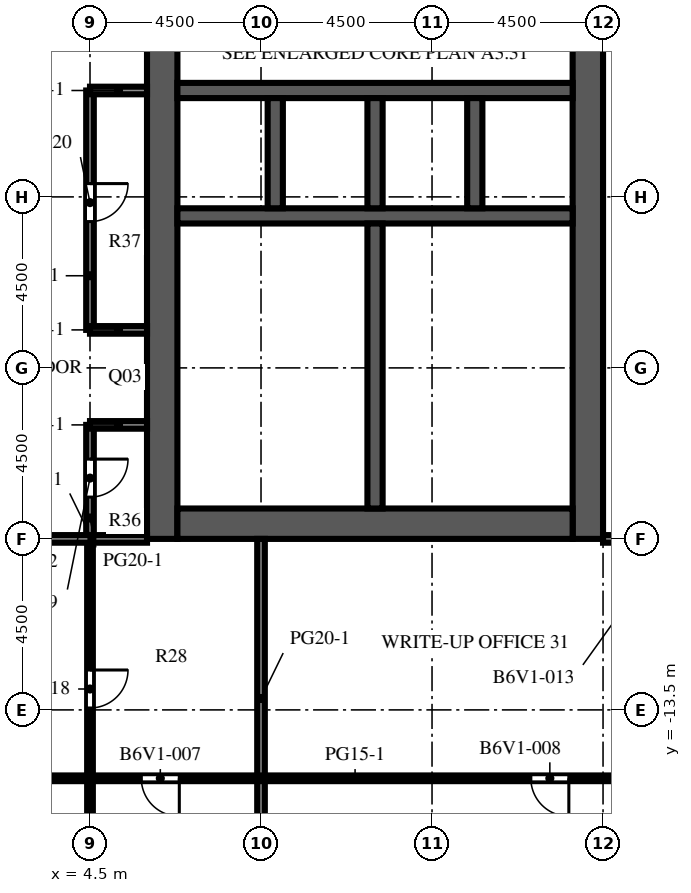
"""IFC4 building model, lengths in metres.
Left out: names, types, materials, properties, quantities, classifications, styles, units other than length and angle.
Written with IfcOpenShell. Run it as: python <this file> out.ifc"""

import sys

from ifc_helpers import new_model, si_unit, direction, frame, frame_2d, origin, place, context, subcontext, project, spatial, rectangle, extrude, element, fill, save


model = new_model("IFC4")
c1 = context("Model", 3, precision=1e-05, world=origin(), true_north=direction((0.0, 1.0)))
c2 = subcontext(c1, "Body", "Model", "MODEL_VIEW")
j1 = project(units=[si_unit("LENGTHUNIT", "METRE"), si_unit("PLANEANGLEUNIT", "RADIAN")], contexts=[c1])
p1 = place(None, origin())
s1 = spatial("IfcSite", under=j1, at=p1, CompositionType="ELEMENT")
p2 = place(p1, origin())
s2 = spatial("IfcBuilding", under=s1, at=p2, CompositionType="ELEMENT")
p3 = place(p2, frame((0.0, 0.0, 203.8)))
s3 = spatial("IfcBuildingStorey", under=s2, at=p3, CompositionType="ELEMENT", Elevation=203.8)
p4 = place(p3, frame((6.4, -9.0, 0.0), z_axis=(0.0, 0.0, 1.0), x_axis=(0.0, 1.0, 0.0)))
e1 = element("IfcWall", 1, at=p4, inside=s3, PredefinedType="SHEAR", context=c2, shape_type="SweptSolid", body=[
    extrude(rectangle(XDim=27.5, YDim=0.8, at=frame_2d((13.75, 0.0))), origin(), (0.0, 0.0, 1.0), 4.1),
])
p5 = place(p4, frame((12.55, 0.0, 0.0)))
e2 = element("IfcOpeningElement", 2, at=p5, cuts=e1, PredefinedType="OPENING", context=c2, shape_type="SweptSolid", body=[
    extrude(rectangle(XDim=2.4, YDim=2.4, at=frame_2d((1.2, 1.2))), frame((0.0, 0.41, 0.0), z_axis=(0.0, -1.0, 0.0), x_axis=(1.0, 0.0, 0.0)), (0.0, 0.0, 1.0), 0.82),
])
p6 = place(p4, frame((3.95, 0.0, 0.0)))
e3 = element("IfcOpeningElement", 3, at=p6, cuts=e1, PredefinedType="OPENING", context=c2, shape_type="SweptSolid", body=[
    extrude(rectangle(XDim=1.2, YDim=2.1, at=frame_2d((0.6, 1.05))), frame((0.0, 0.41, 0.0), z_axis=(0.0, -1.0, 0.0), x_axis=(1.0, 0.0, 0.0)), (0.0, 0.0, 1.0), 0.82),
])
p7 = place(p4, frame((22.35, 0.0, 0.0)))
e4 = element("IfcOpeningElement", 4, at=p7, cuts=e1, PredefinedType="OPENING", context=c2, shape_type="SweptSolid", body=[
    extrude(rectangle(XDim=1.2, YDim=2.1, at=frame_2d((0.6, 1.05))), frame((0.0, 0.41, 0.0), z_axis=(0.0, -1.0, 0.0), x_axis=(1.0, 0.0, 0.0)), (0.0, 0.0, 1.0), 0.82),
])
p8 = place(p3, frame((17.6, -9.0, 0.0), z_axis=(0.0, 0.0, 1.0), x_axis=(0.0, 1.0, 0.0)))
e5 = element("IfcWall", 5, at=p8, inside=s3, PredefinedType="SHEAR", context=c2, shape_type="SweptSolid", body=[
    extrude(rectangle(XDim=27.5, YDim=0.8, at=frame_2d((13.75, 0.0))), origin(), (0.0, 0.0, 1.0), 4.1),
])
p9 = place(p8, frame((12.55, 0.0, 0.0)))
e6 = element("IfcOpeningElement", 6, at=p9, cuts=e5, PredefinedType="OPENING", context=c2, shape_type="SweptSolid", body=[
    extrude(rectangle(XDim=2.4, YDim=2.4, at=frame_2d((1.2, 1.2))), frame((0.0, 0.41, 0.0), z_axis=(0.0, -1.0, 0.0), x_axis=(1.0, 0.0, 0.0)), (0.0, 0.0, 1.0), 0.82),
])
p10 = place(p8, frame((6.825, 0.0, 0.0)))
e7 = element("IfcOpeningElement", 7, at=p10, cuts=e5, PredefinedType="OPENING", context=c2, shape_type="SweptSolid", body=[
    extrude(rectangle(XDim=1.2, YDim=2.1, at=frame_2d((0.6, 1.05))), frame((0.0, 0.41, 0.0), z_axis=(0.0, -1.0, 0.0), x_axis=(1.0, 0.0, 0.0)), (0.0, 0.0, 1.0), 0.82),
])
p11 = place(p8, frame((19.475, 0.0, 0.0)))
e8 = element("IfcOpeningElement", 8, at=p11, cuts=e5, PredefinedType="OPENING", context=c2, shape_type="SweptSolid", body=[
    extrude(rectangle(XDim=1.2, YDim=2.1, at=frame_2d((0.6, 1.05))), frame((0.0, 0.41, 0.0), z_axis=(0.0, -1.0, 0.0), x_axis=(1.0, 0.0, 0.0)), (0.0, 0.0, 1.0), 0.82),
])
p12 = place(p3, frame((6.8, -8.6, 0.0), z_axis=(0.0, 0.0, 1.0), x_axis=(1.0, 0.0, 0.0)))
e9 = element("IfcWall", 9, at=p12, inside=s3, PredefinedType="SHEAR", context=c2, shape_type="SweptSolid", body=[
    extrude(rectangle(XDim=10.4, YDim=0.8, at=frame_2d((5.2, 0.0))), origin(), (0.0, 0.0, 1.0), 4.1),
])
p13 = place(p3, frame((6.8, -0.5, 0.0), z_axis=(0.0, 0.0, 1.0), x_axis=(1.0, 0.0, 0.0)))
e10 = element("IfcWall", 10, at=p13, inside=s3, PredefinedType="SHEAR", context=c2, shape_type="SweptSolid", body=[
    extrude(rectangle(XDim=10.4, YDim=0.4, at=frame_2d((5.2, 0.0))), origin(), (0.0, 0.0, 1.0), 4.1),
])
p14 = place(p3, frame((6.8, 2.8, 0.0), z_axis=(0.0, 0.0, 1.0), x_axis=(1.0, 0.0, 0.0)))
e11 = element("IfcWall", 11, at=p14, inside=s3, PredefinedType="SHEAR", context=c2, shape_type="SweptSolid", body=[
    extrude(rectangle(XDim=10.4, YDim=0.4, at=frame_2d((5.2, 0.0))), origin(), (0.0, 0.0, 1.0), 4.1),
])
p15 = place(p14, frame((0.738, 0.0, 0.0)))
e12 = element("IfcOpeningElement", 12, at=p15, cuts=e11, PredefinedType="OPENING", context=c2, shape_type="SweptSolid", body=[
    extrude(rectangle(XDim=1.1, YDim=2.1, at=frame_2d((0.55, 1.05))), frame((0.0, 0.21, 0.0), z_axis=(0.0, -1.0, 0.0), x_axis=(1.0, 0.0, 0.0)), (0.0, 0.0, 1.0), 0.42),
])
p16 = place(p14, frame((3.337, 0.0, 0.0)))
e13 = element("IfcOpeningElement", 13, at=p16, cuts=e11, PredefinedType="OPENING", context=c2, shape_type="SweptSolid", body=[
    extrude(rectangle(XDim=1.1, YDim=2.1, at=frame_2d((0.55, 1.05))), frame((0.0, 0.21, 0.0), z_axis=(0.0, -1.0, 0.0), x_axis=(1.0, 0.0, 0.0)), (0.0, 0.0, 1.0), 0.42),
])
p17 = place(p14, frame((6.012, 0.0, 0.0)))
e14 = element("IfcOpeningElement", 14, at=p17, cuts=e11, PredefinedType="OPENING", context=c2, shape_type="SweptSolid", body=[
    extrude(rectangle(XDim=1.0, YDim=2.1, at=frame_2d((0.5, 1.05))), frame((0.0, 0.21, 0.0), z_axis=(0.0, -1.0, 0.0), x_axis=(1.0, 0.0, 0.0)), (0.0, 0.0, 1.0), 0.42),
])
p18 = place(p14, frame((8.613, 0.0, 0.0)))
e15 = element("IfcOpeningElement", 15, at=p18, cuts=e11, PredefinedType="OPENING", context=c2, shape_type="SweptSolid", body=[
    extrude(rectangle(XDim=1.0, YDim=2.1, at=frame_2d((0.5, 1.05))), frame((0.0, 0.21, 0.0), z_axis=(0.0, -1.0, 0.0), x_axis=(1.0, 0.0, 0.0)), (0.0, 0.0, 1.0), 0.42),
])
for number, where, z_axis, x_axis in (
    (16, (9.375, -0.3, 0.0), (0.0, 0.0, 1.0), (0.0, 1.0, 0.0)),
    (17, (12.0, -0.3, 0.0), (0.0, 0.0, 1.0), (0.0, 1.0, 0.0)),
    (18, (14.625, -0.3, 0.0), (0.0, 0.0, 1.0), (0.0, 1.0, 0.0)),
):
    element("IfcWall", number, at=place(p3, frame(where, z_axis=z_axis, x_axis=x_axis)), inside=s3, PredefinedType="SHEAR", context=c2, shape_type="SweptSolid", body=[
        extrude(rectangle(XDim=2.9, YDim=0.4, at=frame_2d((1.45, 0.0))), origin(), (0.0, 0.0, 1.0), 4.1),
    ])
p19 = place(p3, frame((12.0, -8.2, 0.0), z_axis=(0.0, 0.0, 1.0), x_axis=(0.0, 1.0, 0.0)))
e19 = element("IfcWall", 19, at=p19, inside=s3, PredefinedType="SHEAR", context=c2, shape_type="SweptSolid", body=[
    extrude(rectangle(XDim=7.5, YDim=0.4, at=frame_2d((3.75, 0.0))), origin(), (0.0, 0.0, 1.0), 4.1),
])
p20 = place(p3, frame((8.3, -8.2, 0.0), z_axis=(0.0, 0.0, 1.0), x_axis=(0.0, 1.0, 0.0)))
e20 = element("IfcWall", 20, at=p20, inside=s3, PredefinedType="PARTITIONING", context=c2, shape_type="SweptSolid", body=[
    extrude(rectangle(XDim=2.25, YDim=0.1, at=frame_2d((1.125, 0.0))), origin(), (0.0, 0.0, 1.0), 3.65),
])
p21 = place(p20, frame((0.625, 0.0, 0.0)))
e21 = element("IfcOpeningElement", 21, at=p21, cuts=e20, PredefinedType="OPENING", context=c2, shape_type="SweptSolid", body=[
    extrude(rectangle(XDim=1.0, YDim=2.1, at=frame_2d((0.5, 1.05))), frame((0.0, 0.06, 0.0), z_axis=(0.0, -1.0, 0.0), x_axis=(1.0, 0.0, 0.0)), (0.0, 0.0, 1.0), 0.12),
])
p22 = place(p3, frame((8.3, -5.95, 0.0), z_axis=(0.0, 0.0, 1.0), x_axis=(0.0, 1.0, 0.0)))
e22 = element("IfcWall", 22, at=p22, inside=s3, PredefinedType="PARTITIONING", context=c2, shape_type="SweptSolid", body=[
    extrude(rectangle(XDim=2.25, YDim=0.1, at=frame_2d((1.125, 0.0))), origin(), (0.0, 0.0, 1.0), 3.65),
])
p23 = place(p22, frame((0.625, 0.0, 0.0)))
e23 = element("IfcOpeningElement", 23, at=p23, cuts=e22, PredefinedType="OPENING", context=c2, shape_type="SweptSolid", body=[
    extrude(rectangle(XDim=1.0, YDim=2.1, at=frame_2d((0.5, 1.05))), frame((0.0, 0.06, 0.0), z_axis=(0.0, -1.0, 0.0), x_axis=(1.0, 0.0, 0.0)), (0.0, 0.0, 1.0), 0.12),
])
p24 = place(p3, frame((8.3, -3.7, 0.0), z_axis=(0.0, 0.0, 1.0), x_axis=(0.0, 1.0, 0.0)))
e24 = element("IfcWall", 24, at=p24, inside=s3, PredefinedType="PARTITIONING", context=c2, shape_type="SweptSolid", body=[
    extrude(rectangle(XDim=1.65, YDim=0.1, at=frame_2d((0.825, 0.0))), origin(), (0.0, 0.0, 1.0), 3.65),
])
p25 = place(p24, frame((0.325, 0.0, 0.0)))
e25 = element("IfcOpeningElement", 25, at=p25, cuts=e24, PredefinedType="OPENING", context=c2, shape_type="SweptSolid", body=[
    extrude(rectangle(XDim=1.0, YDim=2.1, at=frame_2d((0.5, 1.05))), frame((0.0, 0.06, 0.0), z_axis=(0.0, -1.0, 0.0), x_axis=(1.0, 0.0, 0.0)), (0.0, 0.0, 1.0), 0.12),
])
p26 = place(p3, frame((8.3, -2.05, 0.0), z_axis=(0.0, 0.0, 1.0), x_axis=(0.0, 1.0, 0.0)))
e26 = element("IfcWall", 26, at=p26, inside=s3, PredefinedType="PARTITIONING", context=c2, shape_type="SweptSolid", body=[
    extrude(rectangle(XDim=1.35, YDim=0.1, at=frame_2d((0.675, 0.0))), origin(), (0.0, 0.0, 1.0), 3.65),
])
p27 = place(p26, frame((0.2, 0.0, 0.0)))
e27 = element("IfcOpeningElement", 27, at=p27, cuts=e26, PredefinedType="OPENING", context=c2, shape_type="SweptSolid", body=[
    extrude(rectangle(XDim=0.95, YDim=2.1, at=frame_2d((0.475, 1.05))), frame((0.0, 0.06, 0.0), z_axis=(0.0, -1.0, 0.0), x_axis=(1.0, 0.0, 0.0)), (0.0, 0.0, 1.0), 0.12),
])
for number, where, z_axis, x_axis in (
    (28, (8.3, -5.95, 0.0), (0.0, 0.0, 1.0), (1.0, 0.0, 0.0)),
    (29, (8.3, -3.7, 0.0), (0.0, 0.0, 1.0), (1.0, 0.0, 0.0)),
    (30, (8.3, -2.05, 0.0), (0.0, 0.0, 1.0), (1.0, 0.0, 0.0)),
):
    element("IfcWall", number, at=place(p3, frame(where, z_axis=z_axis, x_axis=x_axis)), inside=s3, PredefinedType="PARTITIONING", context=c2, shape_type="SweptSolid", body=[
        extrude(rectangle(XDim=3.5, YDim=0.1, at=frame_2d((1.75, 0.0))), origin(), (0.0, 0.0, 1.0), 3.65),
    ])
p28 = place(p3, frame((4.5, -9.0, 0.0), z_axis=(0.0, 0.0, 1.0), x_axis=(0.0, -1.0, 0.0)))
e31 = element("IfcWall", 31, at=p28, inside=s3, PredefinedType="PARTITIONING", context=c2, shape_type="SweptSolid", body=[
    extrude(rectangle(XDim=17.5, YDim=0.15, at=frame_2d((8.75, 0.0))), origin(), (0.0, 0.0, 1.0), 3.65),
])
p29 = place(p28, frame((3.45, 0.0, 0.0)))
e32 = element("IfcOpeningElement", 32, at=p29, cuts=e31, PredefinedType="OPENING", context=c2, shape_type="SweptSolid", body=[
    extrude(rectangle(XDim=1.0, YDim=2.1, at=frame_2d((0.5, 1.05))), frame((0.0, 0.085, 0.0), z_axis=(0.0, -1.0, 0.0), x_axis=(1.0, 0.0, 0.0)), (0.0, 0.0, 1.0), 0.17),
])
p30 = place(p3, frame((4.5, -6.0, 0.0), z_axis=(0.0, 0.0, 1.0), x_axis=(0.0, -1.0, 0.0)))
e33 = element("IfcWall", 33, at=p30, inside=s3, PredefinedType="PARTITIONING", context=c2, shape_type="SweptSolid", body=[
    extrude(rectangle(XDim=3.0, YDim=0.2, at=frame_2d((1.5, 0.0))), origin(), (0.0, 0.0, 1.0), 3.65),
])
p31 = place(p30, frame((0.9, 0.0, 0.0)))
e34 = element("IfcOpeningElement", 34, at=p31, cuts=e33, PredefinedType="OPENING", context=c2, shape_type="SweptSolid", body=[
    extrude(rectangle(XDim=1.0, YDim=2.1, at=frame_2d((0.5, 1.05))), frame((0.0, 0.11, 0.0), z_axis=(0.0, -1.0, 0.0), x_axis=(1.0, 0.0, 0.0)), (0.0, 0.0, 1.0), 0.22),
])
p32 = place(p3, frame((4.5, 2.8, 0.0), z_axis=(0.0, 0.0, 1.0), x_axis=(0.0, -1.0, 0.0)))
e35 = element("IfcWall", 35, at=p32, inside=s3, PredefinedType="PARTITIONING", context=c2, shape_type="SweptSolid", body=[
    extrude(rectangle(XDim=6.3, YDim=0.2, at=frame_2d((3.15, 0.0))), origin(), (0.0, 0.0, 1.0), 3.65),
])
p33 = place(p32, frame((2.45, 0.0, 0.0)))
e36 = element("IfcOpeningElement", 36, at=p33, cuts=e35, PredefinedType="OPENING", context=c2, shape_type="SweptSolid", body=[
    extrude(rectangle(XDim=1.0, YDim=2.1, at=frame_2d((0.5, 1.05))), frame((0.0, 0.11, 0.0), z_axis=(0.0, -1.0, 0.0), x_axis=(1.0, 0.0, 0.0)), (0.0, 0.0, 1.0), 0.22),
])
p34 = place(p3, frame((9.0, -17.4, 0.0), z_axis=(0.0, 0.0, 1.0), x_axis=(0.0, 1.0, 0.0)))
e37 = element("IfcWall", 37, at=p34, inside=s3, PredefinedType="PARTITIONING", context=c2, shape_type="SweptSolid", body=[
    extrude(rectangle(XDim=8.4, YDim=0.2, at=frame_2d((4.2, 0.0))), origin(), (0.0, 0.0, 1.0), 3.65),
])
p35 = place(p3, frame((21.0, -15.3, 0.0), z_axis=(0.0, 0.0, 1.0), x_axis=(-1.0, 0.0, 0.0)))
e38 = element("IfcWall", 38, at=p35, inside=s3, PredefinedType="PARTITIONING", context=c2, shape_type="SweptSolid", body=[
    extrude(rectangle(XDim=34.5, YDim=0.15, at=frame_2d((17.25, 0.0))), origin(), (0.0, 0.0, 1.0), 3.65),
])
p36 = place(p35, frame((28.9, 0.0, 0.0)))
e39 = element("IfcOpeningElement", 39, at=p36, cuts=e38, PredefinedType="OPENING", context=c2, shape_type="SweptSolid", body=[
    extrude(rectangle(XDim=1.0, YDim=2.1, at=frame_2d((0.5, 1.05))), frame((0.0, 0.085, 0.0), z_axis=(0.0, -1.0, 0.0), x_axis=(1.0, 0.0, 0.0)), (0.0, 0.0, 1.0), 0.17),
])
p37 = place(p35, frame((19.4, 0.0, 0.0)))
e40 = element("IfcOpeningElement", 40, at=p37, cuts=e38, PredefinedType="OPENING", context=c2, shape_type="SweptSolid", body=[
    extrude(rectangle(XDim=1.0, YDim=2.1, at=frame_2d((0.5, 1.05))), frame((0.0, 0.085, 0.0), z_axis=(0.0, -1.0, 0.0), x_axis=(1.0, 0.0, 0.0)), (0.0, 0.0, 1.0), 0.17),
])
p38 = place(p35, frame((14.15, 0.0, 0.0)))
e41 = element("IfcOpeningElement", 41, at=p38, cuts=e38, PredefinedType="OPENING", context=c2, shape_type="SweptSolid", body=[
    extrude(rectangle(XDim=1.0, YDim=2.1, at=frame_2d((0.5, 1.05))), frame((0.0, 0.085, 0.0), z_axis=(0.0, -1.0, 0.0), x_axis=(1.0, 0.0, 0.0)), (0.0, 0.0, 1.0), 0.17),
])
p39 = place(p35, frame((3.9, 0.0, 0.0)))
e42 = element("IfcOpeningElement", 42, at=p39, cuts=e38, PredefinedType="OPENING", context=c2, shape_type="SweptSolid", body=[
    extrude(rectangle(XDim=1.0, YDim=2.1, at=frame_2d((0.5, 1.05))), frame((0.0, 0.085, 0.0), z_axis=(0.0, -1.0, 0.0), x_axis=(1.0, 0.0, 0.0)), (0.0, 0.0, 1.0), 0.17),
])
p40 = place(p3, frame((6.0, -9.0, 0.0), z_axis=(0.0, 0.0, 1.0), x_axis=(-1.0, 0.0, 0.0)))
e43 = element("IfcWall", 43, at=p40, inside=s3, PredefinedType="PARTITIONING", context=c2, shape_type="SweptSolid", body=[
    extrude(rectangle(XDim=4.5, YDim=0.2, at=frame_2d((2.25, 0.0))), origin(), (0.0, 0.0, 1.0), 3.65),
])
p41 = place(p40, frame((2.9, 0.0, 0.0)))
e44 = element("IfcOpeningElement", 44, at=p41, cuts=e43, PredefinedType="OPENING", context=c2, shape_type="SweptSolid", body=[
    extrude(rectangle(XDim=1.0, YDim=2.1, at=frame_2d((0.5, 1.05))), frame((0.0, 0.11, 0.0), z_axis=(0.0, -1.0, 0.0), x_axis=(1.0, 0.0, 0.0)), (0.0, 0.0, 1.0), 0.22),
])
p42 = place(p3, frame((21.0, -9.0, 0.0), z_axis=(0.0, 0.0, 1.0), x_axis=(-1.0, 0.0, 0.0)))
e45 = element("IfcWall", 45, at=p42, inside=s3, PredefinedType="PARTITIONING", context=c2, shape_type="SweptSolid", body=[
    extrude(rectangle(XDim=3.0, YDim=0.2, at=frame_2d((1.5, 0.0))), origin(), (0.0, 0.0, 1.0), 3.65),
])
p43 = place(p42, frame((0.65, 0.0, 0.0)))
e46 = element("IfcOpeningElement", 46, at=p43, cuts=e45, PredefinedType="OPENING", context=c2, shape_type="SweptSolid", body=[
    extrude(rectangle(XDim=1.0, YDim=2.1, at=frame_2d((0.5, 1.05))), frame((0.0, 0.11, 0.0), z_axis=(0.0, -1.0, 0.0), x_axis=(1.0, 0.0, 0.0)), (0.0, 0.0, 1.0), 0.22),
])
for number, where, z_axis, x_axis in (
    (47, (4.5, -6.0, 0.0), (0.0, 0.0, 1.0), (1.0, 0.0, 0.0)),
    (48, (4.5, -3.5, 0.0), (0.0, 0.0, 1.0), (1.0, 0.0, 0.0)),
    (49, (4.5, 2.8, 0.0), (0.0, 0.0, 1.0), (1.0, 0.0, 0.0)),
):
    element("IfcWall", number, at=place(p3, frame(where, z_axis=z_axis, x_axis=x_axis)), inside=s3, PredefinedType="PARTITIONING", context=c2, shape_type="SweptSolid", body=[
        extrude(rectangle(XDim=1.5, YDim=0.2, at=frame_2d((0.75, 0.0))), origin(), (0.0, 0.0, 1.0), 3.65),
    ])
p44 = place(p15, origin())
e50 = element("IfcDoor", 50, at=p44, inside=s3, OperationType="DOUBLE_DOOR_SLIDING", PredefinedType="DOOR", context=c2, shape_type="SweptSolid", body=[
    extrude(rectangle(XDim=1.1, YDim=2.1, at=frame_2d((0.55, 1.05))), frame((0.0, 0.025, 0.0), z_axis=(0.0, -1.0, 0.0), x_axis=(1.0, 0.0, 0.0)), (0.0, 0.0, 1.0), 0.05),
])
fill(e12, e50)
p45 = place(p16, origin())
e51 = element("IfcDoor", 51, at=p45, inside=s3, OperationType="DOUBLE_DOOR_SLIDING", PredefinedType="DOOR", context=c2, shape_type="SweptSolid", body=[
    extrude(rectangle(XDim=1.1, YDim=2.1, at=frame_2d((0.55, 1.05))), frame((0.0, 0.025, 0.0), z_axis=(0.0, -1.0, 0.0), x_axis=(1.0, 0.0, 0.0)), (0.0, 0.0, 1.0), 0.05),
])
fill(e13, e51)
p46 = place(p5, origin())
e52 = element("IfcDoor", 52, at=p46, inside=s3, OperationType="DOUBLE_DOOR_DOUBLE_SWING", PredefinedType="DOOR", context=c2, shape_type="SweptSolid", body=[
    extrude(rectangle(XDim=2.4, YDim=2.4, at=frame_2d((1.2, 1.2))), frame((0.0, 0.025, 0.0), z_axis=(0.0, -1.0, 0.0), x_axis=(1.0, 0.0, 0.0)), (0.0, 0.0, 1.0), 0.05),
])
fill(e2, e52)
p47 = place(p9, origin())
e53 = element("IfcDoor", 53, at=p47, inside=s3, OperationType="DOUBLE_DOOR_DOUBLE_SWING", PredefinedType="DOOR", context=c2, shape_type="SweptSolid", body=[
    extrude(rectangle(XDim=2.4, YDim=2.4, at=frame_2d((1.2, 1.2))), frame((0.0, 0.025, 0.0), z_axis=(0.0, -1.0, 0.0), x_axis=(1.0, 0.0, 0.0)), (0.0, 0.0, 1.0), 0.05),
])
fill(e6, e53)
p48 = place(p10, frame((1.2, 0.0, 0.0), z_axis=(0.0, 0.0, 1.0), x_axis=(-1.0, 0.0, 0.0)))
e54 = element("IfcDoor", 54, at=p48, inside=s3, OperationType="SINGLE_SWING_LEFT", PredefinedType="DOOR", context=c2, shape_type="SweptSolid", body=[
    extrude(rectangle(XDim=1.2, YDim=2.1, at=frame_2d((0.6, 1.05))), frame((0.0, 0.025, 0.0), z_axis=(0.0, -1.0, 0.0), x_axis=(1.0, 0.0, 0.0)), (0.0, 0.0, 1.0), 0.05),
])
fill(e7, e54)
p49 = place(p17, origin())
e55 = element("IfcDoor", 55, at=p49, inside=s3, OperationType="SINGLE_SWING_LEFT", PredefinedType="DOOR", context=c2, shape_type="SweptSolid", body=[
    extrude(rectangle(XDim=1.0, YDim=2.1, at=frame_2d((0.5, 1.05))), frame((0.0, 0.025, 0.0), z_axis=(0.0, -1.0, 0.0), x_axis=(1.0, 0.0, 0.0)), (0.0, 0.0, 1.0), 0.05),
])
fill(e14, e55)
p50 = place(p18, origin())
e56 = element("IfcDoor", 56, at=p50, inside=s3, OperationType="SINGLE_SWING_RIGHT", PredefinedType="DOOR", context=c2, shape_type="SweptSolid", body=[
    extrude(rectangle(XDim=1.0, YDim=2.1, at=frame_2d((0.5, 1.05))), frame((0.0, 0.025, 0.0), z_axis=(0.0, -1.0, 0.0), x_axis=(1.0, 0.0, 0.0)), (0.0, 0.0, 1.0), 0.05),
])
fill(e15, e56)
p51 = place(p6, origin())
e57 = element("IfcDoor", 57, at=p51, inside=s3, OperationType="SINGLE_SWING_RIGHT", PredefinedType="DOOR", context=c2, shape_type="SweptSolid", body=[
    extrude(rectangle(XDim=1.2, YDim=2.1, at=frame_2d((0.6, 1.05))), frame((0.0, -0.325, 0.0), z_axis=(0.0, -1.0, 0.0), x_axis=(1.0, 0.0, 0.0)), (0.0, 0.0, 1.0), 0.05),
])
fill(e3, e57)
p52 = place(p21, origin())
e58 = element("IfcDoor", 58, at=p52, inside=s3, OperationType="SINGLE_SWING_LEFT", PredefinedType="DOOR", context=c2, shape_type="SweptSolid", body=[
    extrude(rectangle(XDim=1.0, YDim=2.1, at=frame_2d((0.5, 1.05))), frame((0.0, 0.025, 0.0), z_axis=(0.0, -1.0, 0.0), x_axis=(1.0, 0.0, 0.0)), (0.0, 0.0, 1.0), 0.05),
])
fill(e21, e58)
p53 = place(p23, origin())
e59 = element("IfcDoor", 59, at=p53, inside=s3, OperationType="SINGLE_SWING_RIGHT", PredefinedType="DOOR", context=c2, shape_type="SweptSolid", body=[
    extrude(rectangle(XDim=1.0, YDim=2.1, at=frame_2d((0.5, 1.05))), frame((0.0, 0.025, 0.0), z_axis=(0.0, -1.0, 0.0), x_axis=(1.0, 0.0, 0.0)), (0.0, 0.0, 1.0), 0.05),
])
fill(e23, e59)
p54 = place(p25, origin())
e60 = element("IfcDoor", 60, at=p54, inside=s3, OperationType="SINGLE_SWING_LEFT", PredefinedType="DOOR", context=c2, shape_type="SweptSolid", body=[
    extrude(rectangle(XDim=1.0, YDim=2.1, at=frame_2d((0.5, 1.05))), frame((0.0, 0.025, 0.0), z_axis=(0.0, -1.0, 0.0), x_axis=(1.0, 0.0, 0.0)), (0.0, 0.0, 1.0), 0.05),
])
fill(e25, e60)
p55 = place(p27, origin())
e61 = element("IfcDoor", 61, at=p55, inside=s3, OperationType="SINGLE_SWING_RIGHT", PredefinedType="DOOR", context=c2, shape_type="SweptSolid", body=[
    extrude(rectangle(XDim=0.95, YDim=2.1, at=frame_2d((0.475, 1.05))), frame((0.0, 0.025, 0.0), z_axis=(0.0, -1.0, 0.0), x_axis=(1.0, 0.0, 0.0)), (0.0, 0.0, 1.0), 0.05),
])
fill(e27, e61)
p56 = place(p38, origin())
e62 = element("IfcDoor", 62, at=p56, inside=s3, OperationType="SINGLE_SWING_LEFT", PredefinedType="DOOR", context=c2, shape_type="SweptSolid", body=[
    extrude(rectangle(XDim=1.0, YDim=2.1, at=frame_2d((0.5, 1.05))), frame((0.0, 0.025, 0.0), z_axis=(0.0, -1.0, 0.0), x_axis=(1.0, 0.0, 0.0)), (0.0, 0.0, 1.0), 0.05),
])
fill(e41, e62)
p57 = place(p39, origin())
e63 = element("IfcDoor", 63, at=p57, inside=s3, OperationType="SINGLE_SWING_LEFT", PredefinedType="DOOR", context=c2, shape_type="SweptSolid", body=[
    extrude(rectangle(XDim=1.0, YDim=2.1, at=frame_2d((0.5, 1.05))), frame((0.0, 0.025, 0.0), z_axis=(0.0, -1.0, 0.0), x_axis=(1.0, 0.0, 0.0)), (0.0, 0.0, 1.0), 0.05),
])
fill(e42, e63)
p58 = place(p29, origin())
e64 = element("IfcDoor", 64, at=p58, inside=s3, OperationType="SINGLE_SWING_LEFT", PredefinedType="DOOR", context=c2, shape_type="SweptSolid", body=[
    extrude(rectangle(XDim=1.0, YDim=2.1, at=frame_2d((0.5, 1.05))), frame((0.0, 0.025, 0.0), z_axis=(0.0, -1.0, 0.0), x_axis=(1.0, 0.0, 0.0)), (0.0, 0.0, 1.0), 0.05),
])
fill(e32, e64)
p59 = place(p31, origin())
e65 = element("IfcDoor", 65, at=p59, inside=s3, OperationType="SINGLE_SWING_LEFT", PredefinedType="DOOR", context=c2, shape_type="SweptSolid", body=[
    extrude(rectangle(XDim=1.0, YDim=2.1, at=frame_2d((0.5, 1.05))), frame((0.0, 0.025, 0.0), z_axis=(0.0, -1.0, 0.0), x_axis=(1.0, 0.0, 0.0)), (0.0, 0.0, 1.0), 0.05),
])
fill(e34, e65)
p60 = place(p33, origin())
e66 = element("IfcDoor", 66, at=p60, inside=s3, OperationType="SINGLE_SWING_LEFT", PredefinedType="DOOR", context=c2, shape_type="SweptSolid", body=[
    extrude(rectangle(XDim=1.0, YDim=2.1, at=frame_2d((0.5, 1.05))), frame((0.0, 0.025, 0.0), z_axis=(0.0, -1.0, 0.0), x_axis=(1.0, 0.0, 0.0)), (0.0, 0.0, 1.0), 0.05),
])
fill(e36, e66)
save(model, sys.argv[1])
